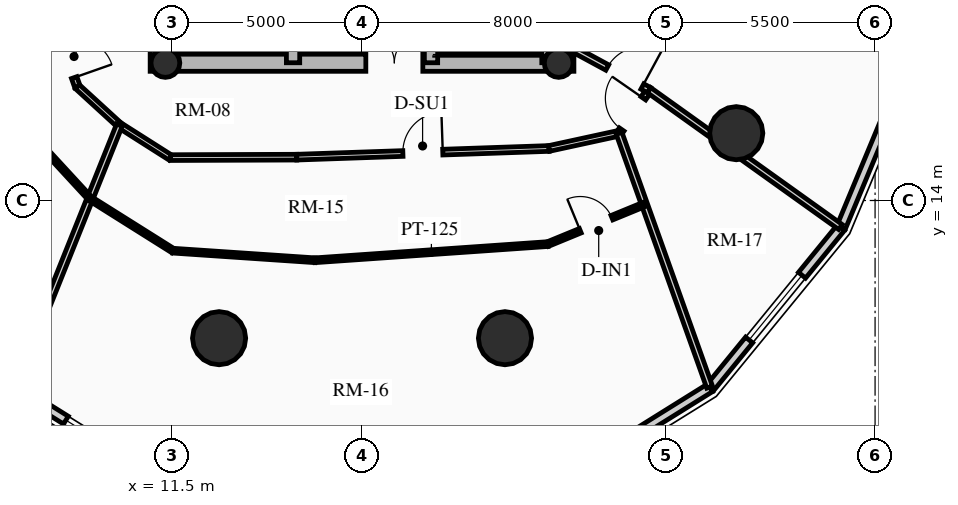
"""IFC4 building model, lengths in metres.
Left out: names, types, materials, properties, quantities, classifications, styles, units other than length and angle.
Written with IfcOpenShell. Run it as: python <this file> out.ifc"""

import sys

from ifc_helpers import new_model, si_unit, direction, frame, frame_2d, origin, origin_2d, place, context, subcontext, project, spatial, rectangle, circle, hollow_circle, extrude, source, transform, mapped, element, fill, save


model = new_model("IFC4")
c1 = context("Model", 3, precision=1e-05, world=origin(), true_north=direction((0.0, 1.0)))
c2 = subcontext(c1, "Body", "Model", "MODEL_VIEW")
j1 = project(units=[si_unit("LENGTHUNIT", "METRE"), si_unit("PLANEANGLEUNIT", "RADIAN")], contexts=[c1])
p1 = place(None, origin())
s1 = spatial("IfcSite", under=j1, at=p1, CompositionType="ELEMENT")
p2 = place(p1, origin())
s2 = spatial("IfcBuilding", under=s1, at=p2, CompositionType="ELEMENT")
p3 = place(p2, frame((0.0, 0.0, 107.98)))
s3 = spatial("IfcBuildingStorey", under=s2, at=p3, CompositionType="ELEMENT", Elevation=107.98)
for number, where, z_axis, x_axis in (
    (1, (11.15, 17.4, 0.0), (0.0, 0.0, 1.0), (0.0, 1.0, 0.0)),
    (2, (21.85, 17.4, 0.0), (0.0, 0.0, 1.0), (0.0, 1.0, 0.0)),
):
    element("IfcWall", number, at=place(p3, frame(where, z_axis=z_axis, x_axis=x_axis)), inside=s3, PredefinedType="SHEAR", context=c2, shape_type="SweptSolid", body=[
        extrude(rectangle(XDim=14.2, YDim=0.45, at=frame_2d((7.1, 0.0))), origin(), (0.0, 0.0, 1.0), 2.91),
    ])
p4 = place(p3, frame((11.15, 17.625, 0.0), z_axis=(0.0, 0.0, 1.0), x_axis=(1.0, 0.0, 0.0)))
e3 = element("IfcWall", 3, at=p4, inside=s3, PredefinedType="SHEAR", context=c2, shape_type="SweptSolid", body=[
    extrude(rectangle(XDim=10.7, YDim=0.45, at=frame_2d((5.35, 0.0))), origin(), (0.0, 0.0, 1.0), 2.91),
])
m1 = source(origin(), c2, "Body", "SweptSolid", [
    extrude(rectangle(XDim=1.5, YDim=2.02, at=frame_2d((0.75, 1.01))), frame((0.0, 0.235, 0.0), z_axis=(0.0, -1.0, 0.0), x_axis=(1.0, 0.0, 0.0)), (0.0, 0.0, 1.0), 0.47),
])
p5 = place(p4, frame((5.45, 0.0, 0.0)))
e4 = element("IfcOpeningElement", 4, at=p5, cuts=e3, PredefinedType="OPENING", context=c2, shape_type="MappedRepresentation", body=[
    mapped(m1, transform((0.0, 0.0, 0.0), x_axis=(1.0, 0.0, 0.0), y_axis=(0.0, 1.0, 0.0), z_axis=(0.0, 0.0, 1.0), scale=1.0)),
])
p6 = place(p3, frame((14.685, 17.625, 0.0), z_axis=(0.0, 0.0, 1.0), x_axis=(0.0, 1.0, 0.0)))
e5 = element("IfcWall", 5, at=p6, inside=s3, PredefinedType="SHEAR", context=c2, shape_type="SweptSolid", body=[
    extrude(rectangle(XDim=13.75, YDim=0.35, at=frame_2d((6.875, 0.0))), origin(), (0.0, 0.0, 1.0), 2.91),
])
m2 = source(origin(), c2, "Body", "SweptSolid", [
    extrude(rectangle(XDim=1.1, YDim=2.015, at=frame_2d((0.55, 1.007))), frame((0.0, 0.185, 0.0), z_axis=(0.0, -1.0, 0.0), x_axis=(1.0, 0.0, 0.0)), (0.0, 0.0, 1.0), 0.37),
])
p7 = place(p6, frame((4.875, 0.0, 0.0)))
e6 = element("IfcOpeningElement", 6, at=p7, cuts=e5, PredefinedType="OPENING", context=c2, shape_type="MappedRepresentation", body=[
    mapped(m2, transform((0.0, 0.0, 0.0), x_axis=(1.0, 0.0, 0.0), y_axis=(0.0, 1.0, 0.0), z_axis=(0.0, 0.0, 1.0), scale=1.0)),
])
m3 = source(origin(), c2, "Body", "SweptSolid", [
    extrude(rectangle(XDim=1.15, YDim=2.02, at=frame_2d((0.575, 1.01))), frame((0.0, 0.185, 0.0), z_axis=(0.0, -1.0, 0.0), x_axis=(1.0, 0.0, 0.0)), (0.0, 0.0, 1.0), 0.37),
])
p8 = place(p6, frame((7.295, 0.0, 0.0)))
e7 = element("IfcOpeningElement", 7, at=p8, cuts=e5, PredefinedType="OPENING", context=c2, shape_type="MappedRepresentation", body=[
    mapped(m3, transform((0.0, 0.0, 0.0), x_axis=(1.0, 0.0, 0.0), y_axis=(0.0, 1.0, 0.0), z_axis=(0.0, 0.0, 1.0), scale=1.0)),
])
p9 = place(p3, frame((18.315, 17.625, 0.0), z_axis=(0.0, 0.0, 1.0), x_axis=(0.0, 1.0, 0.0)))
e8 = element("IfcWall", 8, at=p9, inside=s3, PredefinedType="SHEAR", context=c2, shape_type="SweptSolid", body=[
    extrude(rectangle(XDim=13.75, YDim=0.35, at=frame_2d((6.875, 0.0))), origin(), (0.0, 0.0, 1.0), 2.91),
])
p10 = place(p9, frame((10.0, 0.0, 0.0)))
e9 = element("IfcOpeningElement", 9, at=p10, cuts=e8, PredefinedType="OPENING", context=c2, shape_type="MappedRepresentation", body=[
    mapped(m2, transform((0.0, 0.0, 0.0), x_axis=(1.0, 0.0, 0.0), y_axis=(0.0, 1.0, 0.0), z_axis=(0.0, 0.0, 1.0), scale=1.0)),
])
p11 = place(p9, frame((12.0, 0.0, 0.0)))
e10 = element("IfcOpeningElement", 10, at=p11, cuts=e8, PredefinedType="OPENING", context=c2, shape_type="MappedRepresentation", body=[
    mapped(m2, transform((0.0, 0.0, 0.0), x_axis=(1.0, 0.0, 0.0), y_axis=(0.0, 1.0, 0.0), z_axis=(0.0, 0.0, 1.0), scale=1.0)),
])
p12 = place(p9, frame((5.305, 0.0, 0.0)))
e11 = element("IfcOpeningElement", 11, at=p12, cuts=e8, PredefinedType="OPENING", context=c2, shape_type="MappedRepresentation", body=[
    mapped(m3, transform((0.0, 0.0, 0.0), x_axis=(1.0, 0.0, 0.0), y_axis=(0.0, 1.0, 0.0), z_axis=(0.0, 0.0, 1.0), scale=1.0)),
])
p13 = place(p3, frame((21.405, 17.625, 0.0), z_axis=(0.0, 0.0, 1.0), x_axis=(0.0, 1.0, 0.0)))
e12 = element("IfcWall", 12, at=p13, inside=s3, PredefinedType="SHEAR", context=c2, shape_type="SweptSolid", body=[
    extrude(rectangle(XDim=6.72, YDim=0.35, at=frame_2d((3.36, 0.0))), origin(), (0.0, 0.0, 1.0), 2.91),
])
for number, where, z_axis, x_axis in (
    (13, (11.325, 17.62, 0.0), (0.0, 0.0, 1.0), (1.0, 0.0, 0.0)),
    (14, (21.675, 17.62, 0.0), (0.0, 0.0, 1.0), (1.0, 0.0, 0.0)),
):
    element("IfcColumn", number, at=place(p3, frame(where, z_axis=z_axis, x_axis=x_axis)), inside=s3, PredefinedType="COLUMN", context=c2, shape_type="SweptSolid", body=[
        extrude(hollow_circle(Radius=0.38, WallThickness=0.032, at=origin_2d()), origin(), (0.0, 0.0, 1.0), 2.91),
    ])
for number, where, z_axis, x_axis in (
    (15, (12.739, 10.377, 0.0), (0.0, 0.0, 1.0), (1.0, 0.0, 0.0)),
    (16, (20.261, 10.377, 0.0), (0.0, 0.0, 1.0), (1.0, 0.0, 0.0)),
    (17, (26.347, 15.771, 0.0), (0.0, 0.0, 1.0), (1.0, 0.0, 0.0)),
):
    element("IfcColumn", number, at=place(p3, frame(where, z_axis=z_axis, x_axis=x_axis)), inside=s3, PredefinedType="USERDEFINED", context=c2, shape_type="SweptSolid", body=[
        extrude(circle(Radius=0.7, at=origin_2d()), origin(), (0.0, 0.0, 1.0), 2.91),
    ])
p14 = place(p3, frame((11.685, 6.363, 0.0), z_axis=(0.0, 0.0, 1.0), x_axis=(-0.848520380187, 0.529162701263, 0.0)))
e18 = element("IfcWall", 18, at=p14, inside=s3, PredefinedType="SOLIDWALL", context=c2, shape_type="SweptSolid", body=[
    extrude(rectangle(XDim=5.119, YDim=0.24, at=frame_2d((2.56, 0.0))), origin(), (0.0, 0.0, 1.0), 2.179),
])
m4 = source(origin(), c2, "Body", "SweptSolid", [
    extrude(rectangle(XDim=1.9, YDim=1.35, at=frame_2d((0.95, 0.675))), frame((0.0, 0.13, 0.0), z_axis=(0.0, -1.0, 0.0), x_axis=(1.0, 0.0, 0.0)), (0.0, 0.0, 1.0), 0.26),
])
p15 = place(p14, frame((1.609, 0.0, 0.65)))
e19 = element("IfcOpeningElement", 19, at=p15, cuts=e18, PredefinedType="OPENING", context=c2, shape_type="MappedRepresentation", body=[
    mapped(m4, transform((0.0, 0.0, 0.0), x_axis=(1.0, 0.0, 0.0), y_axis=(0.0, 1.0, 0.0), z_axis=(0.0, 0.0, 1.0), scale=1.0)),
])
p16 = place(p3, frame((25.658, 9.072, 0.0), z_axis=(0.0, 0.0, 1.0), x_axis=(-0.848520380187, -0.529162701263, 0.0)))
e20 = element("IfcWall", 20, at=p16, inside=s3, PredefinedType="SOLIDWALL", context=c2, shape_type="SweptSolid", body=[
    extrude(rectangle(XDim=5.119, YDim=0.24, at=frame_2d((2.56, 0.0))), origin(), (0.0, 0.0, 1.0), 2.179),
])
p17 = place(p3, frame((29.105, 13.291, 0.0), z_axis=(0.0, 0.0, 1.0), x_axis=(-0.632700781152, -0.77439635945, 0.0)))
e21 = element("IfcWall", 21, at=p17, inside=s3, PredefinedType="SOLIDWALL", context=c2, shape_type="SweptSolid", body=[
    extrude(rectangle(XDim=5.448, YDim=0.24, at=frame_2d((2.724, 0.0))), origin(), (0.0, 0.0, 1.0), 2.179),
])
m5 = source(origin(), c2, "Body", "SweptSolid", [
    extrude(rectangle(XDim=2.2, YDim=1.35, at=frame_2d((1.1, 0.675))), frame((0.0, 0.13, 0.0), z_axis=(0.0, -1.0, 0.0), x_axis=(1.0, 0.0, 0.0)), (0.0, 0.0, 1.0), 0.26),
])
p18 = place(p17, frame((1.624, 0.0, 0.65)))
e22 = element("IfcOpeningElement", 22, at=p18, cuts=e21, PredefinedType="OPENING", context=c2, shape_type="MappedRepresentation", body=[
    mapped(m5, transform((0.0, 0.0, 0.0), x_axis=(1.0, 0.0, 0.0), y_axis=(0.0, 1.0, 0.0), z_axis=(0.0, 0.0, 1.0), scale=1.0)),
])
p19 = place(p3, frame((31.318, 18.607, 0.0), z_axis=(0.0, 0.0, 1.0), x_axis=(-0.384344417632, -0.923189779317, 0.0)))
e23 = element("IfcWall", 23, at=p19, inside=s3, PredefinedType="SOLIDWALL", context=c2, shape_type="SweptSolid", body=[
    extrude(rectangle(XDim=5.758, YDim=0.24, at=frame_2d((2.879, 0.0))), origin(), (0.0, 0.0, 1.0), 2.179),
])
p20 = place(p3, frame((8.538, 18.338, 0.0), z_axis=(0.0, 0.0, 1.0), x_axis=(0.331358150167, -0.94350504838, 0.0)))
e24 = element("IfcWall", 24, at=p20, inside=s3, PredefinedType="PARTITIONING", context=c2, shape_type="SweptSolid", body=[
    extrude(rectangle(XDim=1.424, YDim=0.15, at=frame_2d((0.712, 0.0))), origin(), (0.0, 0.0, 1.0), 2.225),
])
m6 = source(origin(), c2, "Body", "SweptSolid", [
    extrude(rectangle(XDim=1.05, YDim=2.015, at=frame_2d((0.525, 1.007))), frame((0.0, 0.085, 0.0), z_axis=(0.0, -1.0, 0.0), x_axis=(1.0, 0.0, 0.0)), (0.0, 0.0, 1.0), 0.17),
])
p21 = place(p20, frame((0.12, 0.0, 0.0)))
e25 = element("IfcOpeningElement", 25, at=p21, cuts=e24, PredefinedType="OPENING", context=c2, shape_type="MappedRepresentation", body=[
    mapped(m6, transform((0.0, 0.0, 0.0), x_axis=(1.0, 0.0, 0.0), y_axis=(0.0, 1.0, 0.0), z_axis=(0.0, 0.0, 1.0), scale=1.0)),
])
p22 = place(p3, frame((9.01, 16.994, 0.0), z_axis=(0.0, 0.0, 1.0), x_axis=(0.737701798986, -0.67512669609, 0.0)))
e26 = element("IfcWall", 26, at=p22, inside=s3, PredefinedType="PARTITIONING", context=c2, shape_type="SweptSolid", body=[
    extrude(rectangle(XDim=1.498, YDim=0.15, at=frame_2d((0.749, 0.0))), origin(), (0.0, 0.0, 1.0), 2.225),
])
p23 = place(p3, frame((10.115, 15.983, 0.0), z_axis=(0.0, 0.0, 1.0), x_axis=(0.843995849351, -0.536349705209, 0.0)))
e27 = element("IfcWall", 27, at=p23, inside=s3, PredefinedType="PARTITIONING", context=c2, shape_type="SweptSolid", body=[
    extrude(rectangle(XDim=1.593, YDim=0.15, at=frame_2d((0.796, 0.0))), origin(), (0.0, 0.0, 1.0), 2.225),
])
p24 = place(p3, frame((11.46, 15.129, 0.0), z_axis=(0.0, 0.0, 1.0), x_axis=(0.999993513287, 0.003601858435, 0.0)))
e28 = element("IfcWall", 28, at=p24, inside=s3, PredefinedType="PARTITIONING", context=c2, shape_type="SweptSolid", body=[
    extrude(rectangle(XDim=3.321, YDim=0.15, at=frame_2d((1.661, 0.0))), origin(), (0.0, 0.0, 1.0), 2.225),
])
p25 = place(p3, frame((14.781, 15.141, 0.0), z_axis=(0.0, 0.0, 1.0), x_axis=(0.999407918707, 0.034406569513, 0.0)))
e29 = element("IfcWall", 29, at=p25, inside=s3, PredefinedType="PARTITIONING", context=c2, shape_type="SweptSolid", body=[
    extrude(rectangle(XDim=6.642, YDim=0.15, at=frame_2d((3.321, 0.0))), origin(), (0.0, 0.0, 1.0), 2.225),
])
p26 = place(p25, frame((2.796, 0.0, 0.0)))
e30 = element("IfcOpeningElement", 30, at=p26, cuts=e29, PredefinedType="OPENING", context=c2, shape_type="MappedRepresentation", body=[
    mapped(m6, transform((0.0, 0.0, 0.0), x_axis=(1.0, 0.0, 0.0), y_axis=(0.0, 1.0, 0.0), z_axis=(0.0, 0.0, 1.0), scale=1.0)),
])
p27 = place(p3, frame((21.419, 15.369, 0.0), z_axis=(0.0, 0.0, 1.0), x_axis=(0.977192701953, 0.212354475464, 0.0)))
e31 = element("IfcWall", 31, at=p27, inside=s3, PredefinedType="PARTITIONING", context=c2, shape_type="SweptSolid", body=[
    extrude(rectangle(XDim=1.888, YDim=0.15, at=frame_2d((0.944, 0.0))), origin(), (0.0, 0.0, 1.0), 2.225),
])
p28 = place(p3, frame((23.263, 15.77, 0.0), z_axis=(0.0, 0.0, 1.0), x_axis=(0.570743456919, 0.821128434768, 0.0)))
e32 = element("IfcWall", 32, at=p28, inside=s3, PredefinedType="PARTITIONING", context=c2, shape_type="SweptSolid", body=[
    extrude(rectangle(XDim=1.382, YDim=0.15, at=frame_2d((0.691, 0.0))), origin(), (0.0, 0.0, 1.0), 2.225),
])
m7 = source(origin(), c2, "Body", "SweptSolid", [
    extrude(rectangle(XDim=1.0, YDim=2.015, at=frame_2d((0.5, 1.007))), frame((0.0, 0.085, 0.0), z_axis=(0.0, -1.0, 0.0), x_axis=(1.0, 0.0, 0.0)), (0.0, 0.0, 1.0), 0.17),
])
p29 = place(p28, frame((0.12, 0.0, 0.0)))
e33 = element("IfcOpeningElement", 33, at=p29, cuts=e32, PredefinedType="OPENING", context=c2, shape_type="MappedRepresentation", body=[
    mapped(m7, transform((0.0, 0.0, 0.0), x_axis=(1.0, 0.0, 0.0), y_axis=(0.0, 1.0, 0.0), z_axis=(0.0, 0.0, 1.0), scale=1.0)),
])
p30 = place(p3, frame((10.115, 15.983, 0.0), z_axis=(0.0, 0.0, 1.0), x_axis=(-0.371861013147, -0.928288417951, 0.0)))
e34 = element("IfcWall", 34, at=p30, inside=s3, PredefinedType="PARTITIONING", context=c2, shape_type="SweptSolid", body=[
    extrude(rectangle(XDim=7.427, YDim=0.16, at=frame_2d((3.714, 0.0))), origin(), (0.0, 0.0, 1.0), 2.179),
])
p31 = place(p3, frame((23.263, 15.77, 0.0), z_axis=(0.0, 0.0, 1.0), x_axis=(0.335919964206, -0.941890533793, 0.0)))
e35 = element("IfcWall", 35, at=p31, inside=s3, PredefinedType="PARTITIONING", context=c2, shape_type="SweptSolid", body=[
    extrude(rectangle(XDim=7.094, YDim=0.16, at=frame_2d((3.547, 0.0))), origin(), (0.0, 0.0, 1.0), 2.179),
])
p32 = place(p3, frame((24.052, 16.905, 0.0), z_axis=(0.0, 0.0, 1.0), x_axis=(0.813437670746, -0.581652091727, 0.0)))
e36 = element("IfcWall", 36, at=p32, inside=s3, PredefinedType="PARTITIONING", context=c2, shape_type="SweptSolid", body=[
    extrude(rectangle(XDim=6.192, YDim=0.16, at=frame_2d((3.096, 0.0))), origin(), (0.0, 0.0, 1.0), 2.179),
])
p33 = place(p3, frame((22.075, 17.975, 0.0), z_axis=(0.0, 0.0, 1.0), x_axis=(0.879356383302, -0.476164206073, 0.0)))
e37 = element("IfcWall", 37, at=p33, inside=s3, PredefinedType="PARTITIONING", context=c2, shape_type="SweptSolid", body=[
    extrude(rectangle(XDim=2.248, YDim=0.16, at=frame_2d((1.124, 0.0))), origin(), (0.0, 0.0, 1.0), 2.225),
])
m8 = source(origin(), c2, "Body", "SweptSolid", [
    extrude(rectangle(XDim=1.05, YDim=2.015, at=frame_2d((0.525, 1.007))), frame((0.0, 0.09, 0.0), z_axis=(0.0, -1.0, 0.0), x_axis=(1.0, 0.0, 0.0)), (0.0, 0.0, 1.0), 0.18),
])
p34 = place(p33, frame((0.998, 0.0, 0.0)))
e38 = element("IfcOpeningElement", 38, at=p34, cuts=e37, PredefinedType="OPENING", context=c2, shape_type="MappedRepresentation", body=[
    mapped(m8, transform((0.0, 0.0, 0.0), x_axis=(1.0, 0.0, 0.0), y_axis=(0.0, 1.0, 0.0), z_axis=(0.0, 0.0, 1.0), scale=1.0)),
])
p35 = place(p3, frame((7.583, 15.961, 0.0), z_axis=(0.0, 0.0, 1.0), x_axis=(0.677838563189, -0.735210774032, 0.0)))
e39 = element("IfcWall", 39, at=p35, inside=s3, PredefinedType="PARTITIONING", context=c2, shape_type="SweptSolid", body=[
    extrude(rectangle(XDim=2.596, YDim=0.125, at=frame_2d((1.298, 0.0))), origin(), (0.0, 0.0, 1.0), 2.655),
])
p36 = place(p3, frame((9.342, 14.052, 0.0), z_axis=(0.0, 0.0, 1.0), x_axis=(0.846526826244, -0.532346064557, 0.0)))
e40 = element("IfcWall", 40, at=p36, inside=s3, PredefinedType="PARTITIONING", context=c2, shape_type="SweptSolid", body=[
    extrude(rectangle(XDim=2.578, YDim=0.125, at=frame_2d((1.289, 0.0))), origin(), (0.0, 0.0, 1.0), 2.225),
])
p37 = place(p3, frame((11.525, 12.68, 0.0), z_axis=(0.0, 0.0, 1.0), x_axis=(0.997726815836, -0.067388433443, 0.0)))
e41 = element("IfcWall", 41, at=p37, inside=s3, PredefinedType="PARTITIONING", context=c2, shape_type="SweptSolid", body=[
    extrude(rectangle(XDim=3.746, YDim=0.125, at=frame_2d((1.873, 0.0))), origin(), (0.0, 0.0, 1.0), 2.225),
])
p38 = place(p3, frame((15.262, 12.427, 0.0), z_axis=(0.0, 0.0, 1.0), x_axis=(0.997595855995, 0.069300130605, 0.0)))
e42 = element("IfcWall", 42, at=p38, inside=s3, PredefinedType="PARTITIONING", context=c2, shape_type="SweptSolid", body=[
    extrude(rectangle(XDim=6.14, YDim=0.125, at=frame_2d((3.07, 0.0))), origin(), (0.0, 0.0, 1.0), 2.225),
])
p39 = place(p3, frame((21.388, 12.853, 0.0), z_axis=(0.0, 0.0, 1.0), x_axis=(0.924757149715, 0.380557767036, 0.0)))
e43 = element("IfcWall", 43, at=p39, inside=s3, PredefinedType="PARTITIONING", context=c2, shape_type="SweptSolid", body=[
    extrude(rectangle(XDim=2.75, YDim=0.125, at=frame_2d((1.375, 0.0))), origin(), (0.0, 0.0, 1.0), 2.179),
])
m9 = source(origin(), c2, "Body", "SweptSolid", [
    extrude(rectangle(XDim=0.9, YDim=2.005, at=frame_2d((0.45, 1.002))), frame((0.0, 0.073, 0.0), z_axis=(0.0, -1.0, 0.0), x_axis=(1.0, 0.0, 0.0)), (0.0, 0.0, 1.0), 0.145),
])
p40 = place(p39, frame((0.925, 0.0, 0.0)))
e44 = element("IfcOpeningElement", 44, at=p40, cuts=e43, PredefinedType="OPENING", context=c2, shape_type="MappedRepresentation", body=[
    mapped(m9, transform((0.0, 0.0, 0.0), x_axis=(1.0, 0.0, 0.0), y_axis=(0.0, 1.0, 0.0), z_axis=(0.0, 0.0, 1.0), scale=1.0)),
])
m10 = source(origin(), c2, "Body", "SweptSolid", [
    extrude(rectangle(XDim=1.9, YDim=1.35, at=frame_2d((0.95, 0.675))), frame((0.0, 0.03, 0.0), z_axis=(0.0, -1.0, 0.0), x_axis=(1.0, 0.0, 0.0)), (0.0, 0.0, 1.0), 0.06),
])
p41 = place(p15, origin())
e45 = element("IfcWindow", 45, at=p41, inside=s3, PartitioningType="DOUBLE_PANEL_VERTICAL", PredefinedType="WINDOW", context=c2, shape_type="MappedRepresentation", body=[
    mapped(m10, transform((0.0, 0.0, 0.0), x_axis=(1.0, 0.0, 0.0), y_axis=(0.0, 1.0, 0.0), z_axis=(0.0, 0.0, 1.0), scale=1.0)),
])
fill(e19, e45)
m11 = source(origin(), c2, "Body", "SweptSolid", [
    extrude(rectangle(XDim=2.2, YDim=1.35, at=frame_2d((1.1, 0.675))), frame((0.0, 0.03, 0.0), z_axis=(0.0, -1.0, 0.0), x_axis=(1.0, 0.0, 0.0)), (0.0, 0.0, 1.0), 0.06),
])
p42 = place(p18, origin())
e46 = element("IfcWindow", 46, at=p42, inside=s3, PartitioningType="DOUBLE_PANEL_VERTICAL", PredefinedType="WINDOW", context=c2, shape_type="MappedRepresentation", body=[
    mapped(m11, transform((0.0, 0.0, 0.0), x_axis=(1.0, 0.0, 0.0), y_axis=(0.0, 1.0, 0.0), z_axis=(0.0, 0.0, 1.0), scale=1.0)),
])
fill(e22, e46)
m12 = source(origin(), c2, "Body", "SweptSolid", [
    extrude(rectangle(XDim=1.5, YDim=2.02, at=frame_2d((0.75, 1.01))), frame((0.0, 0.025, 0.0), z_axis=(0.0, -1.0, 0.0), x_axis=(1.0, 0.0, 0.0)), (0.0, 0.0, 1.0), 0.05),
])
p43 = place(p5, origin())
e47 = element("IfcDoor", 47, at=p43, inside=s3, OperationType="DOUBLE_DOOR_SINGLE_SWING", PredefinedType="DOOR", context=c2, shape_type="MappedRepresentation", body=[
    mapped(m12, transform((0.0, 0.0, 0.0), x_axis=(1.0, 0.0, 0.0), y_axis=(0.0, 1.0, 0.0), z_axis=(0.0, 0.0, 1.0), scale=1.0)),
])
fill(e4, e47)
m13 = source(origin(), c2, "Body", "SweptSolid", [
    extrude(rectangle(XDim=1.05, YDim=2.015, at=frame_2d((0.525, 1.007))), frame((0.0, 0.025, 0.0), z_axis=(0.0, -1.0, 0.0), x_axis=(1.0, 0.0, 0.0)), (0.0, 0.0, 1.0), 0.05),
])
p44 = place(p34, origin())
e48 = element("IfcDoor", 48, at=p44, inside=s3, OperationType="SINGLE_SWING_RIGHT", PredefinedType="DOOR", context=c2, shape_type="MappedRepresentation", body=[
    mapped(m13, transform((0.0, 0.0, 0.0), x_axis=(1.0, 0.0, 0.0), y_axis=(0.0, 1.0, 0.0), z_axis=(0.0, 0.0, 1.0), scale=1.0)),
])
fill(e38, e48)
p45 = place(p21, origin())
e49 = element("IfcDoor", 49, at=p45, inside=s3, OperationType="SINGLE_SWING_RIGHT", PredefinedType="DOOR", context=c2, shape_type="MappedRepresentation", body=[
    mapped(m13, transform((0.0, 0.0, 0.0), x_axis=(1.0, 0.0, 0.0), y_axis=(0.0, 1.0, 0.0), z_axis=(0.0, 0.0, 1.0), scale=1.0)),
])
fill(e25, e49)
p46 = place(p26, origin())
e50 = element("IfcDoor", 50, at=p46, inside=s3, OperationType="SINGLE_SWING_RIGHT", PredefinedType="DOOR", context=c2, shape_type="MappedRepresentation", body=[
    mapped(m13, transform((0.0, 0.0, 0.0), x_axis=(1.0, 0.0, 0.0), y_axis=(0.0, 1.0, 0.0), z_axis=(0.0, 0.0, 1.0), scale=1.0)),
])
fill(e30, e50)
m14 = source(origin(), c2, "Body", "SweptSolid", [
    extrude(rectangle(XDim=0.9, YDim=2.005, at=frame_2d((0.45, 1.002))), frame((0.0, 0.025, 0.0), z_axis=(0.0, -1.0, 0.0), x_axis=(1.0, 0.0, 0.0)), (0.0, 0.0, 1.0), 0.05),
])
p47 = place(p40, origin())
e51 = element("IfcDoor", 51, at=p47, inside=s3, OperationType="SINGLE_SWING_LEFT", PredefinedType="DOOR", context=c2, shape_type="MappedRepresentation", body=[
    mapped(m14, transform((0.0, 0.0, 0.0), x_axis=(1.0, 0.0, 0.0), y_axis=(0.0, 1.0, 0.0), z_axis=(0.0, 0.0, 1.0), scale=1.0)),
])
fill(e44, e51)
m15 = source(origin(), c2, "Body", "SweptSolid", [
    extrude(rectangle(XDim=1.0, YDim=2.015, at=frame_2d((0.5, 1.007))), frame((0.0, 0.025, 0.0), z_axis=(0.0, -1.0, 0.0), x_axis=(1.0, 0.0, 0.0)), (0.0, 0.0, 1.0), 0.05),
])
p48 = place(p29, origin())
e52 = element("IfcDoor", 52, at=p48, inside=s3, OperationType="SINGLE_SWING_RIGHT", PredefinedType="DOOR", context=c2, shape_type="MappedRepresentation", body=[
    mapped(m15, transform((0.0, 0.0, 0.0), x_axis=(1.0, 0.0, 0.0), y_axis=(0.0, 1.0, 0.0), z_axis=(0.0, 0.0, 1.0), scale=1.0)),
])
fill(e33, e52)
save(model, sys.argv[1])
